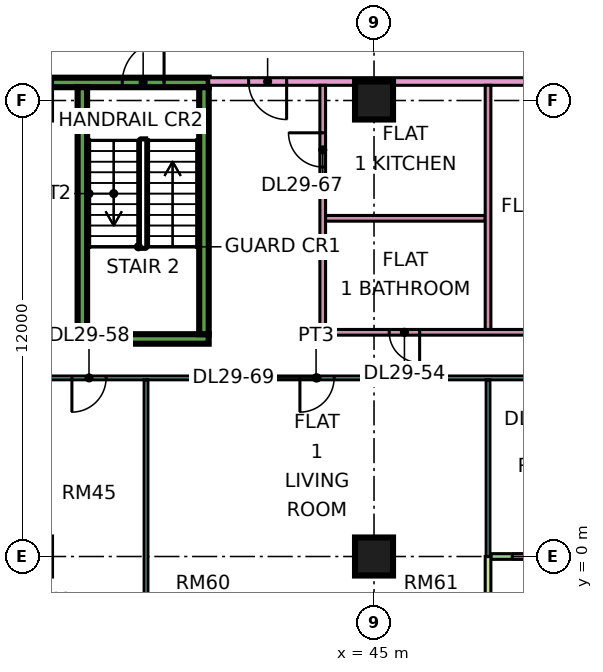
"""IFC4 building model, lengths in metres.
Left out: names, types, materials, properties, quantities, classifications, styles, units other than length and angle.
Written with IfcOpenShell. Run it as: python <this file> out.ifc"""

import sys

from ifc_helpers import new_model, si_unit, direction, frame, frame_2d, origin, origin_2d, place, context, subcontext, project, spatial, rectangle, extrude, element, fill, save


model = new_model("IFC4")
c1 = context("Model", 3, precision=1e-05, world=origin(), true_north=direction((0.0, 1.0)))
c2 = subcontext(c1, "Body", "Model", "MODEL_VIEW")
j1 = project(units=[si_unit("LENGTHUNIT", "METRE"), si_unit("PLANEANGLEUNIT", "RADIAN")], contexts=[c1])
p1 = place(None, origin())
s1 = spatial("IfcSite", under=j1, at=p1, CompositionType="ELEMENT")
p2 = place(p1, origin())
s2 = spatial("IfcBuilding", under=s1, at=p2, CompositionType="ELEMENT")
p3 = place(p2, frame((0.0, 0.0, 125.65)))
s3 = spatial("IfcBuildingStorey", under=s2, at=p3, CompositionType="ELEMENT", Elevation=125.65)
for number, where, z_axis, x_axis in (
    (1, (45.0, 0.0, 0.0), (0.0, 0.0, 1.0), (1.0, 0.0, 0.0)),
    (2, (45.0, 12.0, 0.0), (0.0, 0.0, 1.0), (1.0, 0.0, 0.0)),
):
    element("IfcColumn", number, at=place(p3, frame(where, z_axis=z_axis, x_axis=x_axis)), inside=s3, PredefinedType="COLUMN", context=c2, shape_type="SweptSolid", body=[
        extrude(rectangle(XDim=1.0, YDim=1.0, at=origin_2d()), origin(), (0.0, 0.0, 1.0), 3.75),
    ])
p4 = place(p3, frame((37.2, 5.725, 0.0), z_axis=(0.0, 0.0, 1.0), x_axis=(1.0, 0.0, 0.0)))
e3 = element("IfcWall", 3, at=p4, inside=s3, PredefinedType="SHEAR", context=c2, shape_type="SweptSolid", body=[
    extrude(rectangle(XDim=3.45, YDim=0.25, at=frame_2d((1.725, 0.0))), origin(), (0.0, 0.0, 1.0), 3.75),
])
p5 = place(p3, frame((36.5, 12.475, 0.0), z_axis=(0.0, 0.0, 1.0), x_axis=(1.0, 0.0, 0.0)))
e4 = element("IfcWall", 4, at=p5, inside=s3, PredefinedType="SHEAR", context=c2, shape_type="SweptSolid", body=[
    extrude(rectangle(XDim=4.15, YDim=0.25, at=frame_2d((2.075, 0.0))), origin(), (0.0, 0.0, 1.0), 3.75),
])
p6 = place(p5, frame((1.875, 0.0, 0.0)))
e5 = element("IfcOpeningElement", 5, at=p6, cuts=e4, PredefinedType="OPENING", context=c2, shape_type="SweptSolid", body=[
    extrude(rectangle(XDim=1.1, YDim=2.2, at=frame_2d((0.55, 1.1))), frame((0.0, 0.135, 0.0), z_axis=(0.0, -1.0, 0.0), x_axis=(1.0, 0.0, 0.0)), (0.0, 0.0, 1.0), 0.27),
])
for number, where, z_axis, x_axis in (
    (6, (37.325, 5.85, 0.0), (0.0, 0.0, 1.0), (0.0, 1.0, 0.0)),
    (7, (40.525, 5.85, 0.0), (0.0, 0.0, 1.0), (0.0, 1.0, 0.0)),
):
    element("IfcWall", number, at=place(p3, frame(where, z_axis=z_axis, x_axis=x_axis)), inside=s3, PredefinedType="SHEAR", context=c2, shape_type="SweptSolid", body=[
        extrude(rectangle(XDim=6.5, YDim=0.25, at=frame_2d((3.25, 0.0))), origin(), (0.0, 0.0, 1.0), 3.75),
    ])
p7 = place(p3, frame((48.075, 0.0, 0.0), z_axis=(0.0, 0.0, 1.0), x_axis=(1.0, 0.0, 0.0)))
e8 = element("IfcWall", 8, at=p7, inside=s3, PredefinedType="SOLIDWALL", context=c2, shape_type="SweptSolid", body=[
    extrude(rectangle(XDim=11.85, YDim=0.15, at=frame_2d((5.925, 0.0))), origin(), (0.0, 0.0, 1.0), 3.35),
])
p8 = place(p7, frame((0.562, 0.0, 0.45)))
e9 = element("IfcOpeningElement", 9, at=p8, cuts=e8, PredefinedType="OPENING", context=c2, shape_type="SweptSolid", body=[
    extrude(rectangle(XDim=1.8, YDim=2.4, at=frame_2d((0.9, 1.2))), frame((0.0, 0.085, 0.0), z_axis=(0.0, -1.0, 0.0), x_axis=(1.0, 0.0, 0.0)), (0.0, 0.0, 1.0), 0.17),
])
p9 = place(p7, frame((3.525, 0.0, 0.0)))
e10 = element("IfcOpeningElement", 10, at=p9, cuts=e8, PredefinedType="OPENING", context=c2, shape_type="SweptSolid", body=[
    extrude(rectangle(XDim=1.2, YDim=2.4, at=frame_2d((0.6, 1.2))), frame((0.0, 0.085, 0.0), z_axis=(0.0, -1.0, 0.0), x_axis=(1.0, 0.0, 0.0)), (0.0, 0.0, 1.0), 0.17),
])
p10 = place(p7, frame((7.688, 0.0, 0.45)))
e11 = element("IfcOpeningElement", 11, at=p10, cuts=e8, PredefinedType="OPENING", context=c2, shape_type="SweptSolid", body=[
    extrude(rectangle(XDim=3.0, YDim=2.4, at=frame_2d((1.5, 1.2))), frame((0.0, 0.085, 0.0), z_axis=(0.0, -1.0, 0.0), x_axis=(1.0, 0.0, 0.0)), (0.0, 0.0, 1.0), 0.17),
])
p11 = place(p3, frame((48.0, -1.5, 0.0), z_axis=(0.0, 0.0, 1.0), x_axis=(0.0, 1.0, 0.0)))
e12 = element("IfcWall", 12, at=p11, inside=s3, PredefinedType="SOLIDWALL", context=c2, shape_type="SweptSolid", body=[
    extrude(rectangle(XDim=1.5, YDim=0.15, at=frame_2d((0.75, 0.0))), origin(), (0.0, 0.0, 1.0), 3.35),
])
p12 = place(p3, frame((33.05, 4.7, 0.0), z_axis=(0.0, 0.0, 1.0), x_axis=(1.0, 0.0, 0.0)))
e13 = element("IfcWall", 13, at=p12, inside=s3, PredefinedType="PARTITIONING", context=c2, shape_type="SweptSolid", body=[
    extrude(rectangle(XDim=20.85, YDim=0.1, at=frame_2d((10.425, 0.0))), origin(), (0.0, 0.0, 1.0), 3.35),
])
p13 = place(p12, frame((1.0, 0.0, 0.0)))
e14 = element("IfcOpeningElement", 14, at=p13, cuts=e13, PredefinedType="OPENING", context=c2, shape_type="SweptSolid", body=[
    extrude(rectangle(XDim=0.9, YDim=2.1, at=frame_2d((0.45, 1.05))), frame((0.0, 0.06, 0.0), z_axis=(0.0, -1.0, 0.0), x_axis=(1.0, 0.0, 0.0)), (0.0, 0.0, 1.0), 0.12),
])
p14 = place(p12, frame((4.0, 0.0, 0.0)))
e15 = element("IfcOpeningElement", 15, at=p14, cuts=e13, PredefinedType="OPENING", context=c2, shape_type="SweptSolid", body=[
    extrude(rectangle(XDim=0.9, YDim=2.1, at=frame_2d((0.45, 1.05))), frame((0.0, 0.06, 0.0), z_axis=(0.0, -1.0, 0.0), x_axis=(1.0, 0.0, 0.0)), (0.0, 0.0, 1.0), 0.12),
])
p15 = place(p12, frame((16.0, 0.0, 0.0)))
e16 = element("IfcOpeningElement", 16, at=p15, cuts=e13, PredefinedType="OPENING", context=c2, shape_type="SweptSolid", body=[
    extrude(rectangle(XDim=0.9, YDim=2.1, at=frame_2d((0.45, 1.05))), frame((0.0, 0.06, 0.0), z_axis=(0.0, -1.0, 0.0), x_axis=(1.0, 0.0, 0.0)), (0.0, 0.0, 1.0), 0.12),
])
p16 = place(p12, frame((19.0, 0.0, 0.0)))
e17 = element("IfcOpeningElement", 17, at=p16, cuts=e13, PredefinedType="OPENING", context=c2, shape_type="SweptSolid", body=[
    extrude(rectangle(XDim=0.9, YDim=2.1, at=frame_2d((0.45, 1.05))), frame((0.0, 0.06, 0.0), z_axis=(0.0, -1.0, 0.0), x_axis=(1.0, 0.0, 0.0)), (0.0, 0.0, 1.0), 0.12),
])
p17 = place(p12, frame((10.0, 0.0, 0.0)))
e18 = element("IfcOpeningElement", 18, at=p17, cuts=e13, PredefinedType="OPENING", context=c2, shape_type="SweptSolid", body=[
    extrude(rectangle(XDim=0.9, YDim=2.1, at=frame_2d((0.45, 1.05))), frame((0.0, 0.06, 0.0), z_axis=(0.0, -1.0, 0.0), x_axis=(1.0, 0.0, 0.0)), (0.0, 0.0, 1.0), 0.12),
])
p18 = place(p3, frame((39.0, -1.35, 0.0), z_axis=(0.0, 0.0, 1.0), x_axis=(0.0, 1.0, 0.0)))
e19 = element("IfcWall", 19, at=p18, inside=s3, PredefinedType="PARTITIONING", context=c2, shape_type="SweptSolid", body=[
    extrude(rectangle(XDim=6.0, YDim=0.1, at=frame_2d((3.0, 0.0))), origin(), (0.0, 0.0, 1.0), 3.35),
])
p19 = place(p3, frame((40.65, 12.5, 0.0), z_axis=(0.0, 0.0, 1.0), x_axis=(1.0, 0.0, 0.0)))
e20 = element("IfcWall", 20, at=p19, inside=s3, PredefinedType="PARTITIONING", context=c2, shape_type="SweptSolid", body=[
    extrude(rectangle(XDim=31.35, YDim=0.2, at=frame_2d((15.675, 0.0))), origin(), (0.0, 0.0, 1.0), 3.35),
])
p20 = place(p19, frame((20.1, 0.0, 0.0)))
e21 = element("IfcOpeningElement", 21, at=p20, cuts=e20, PredefinedType="OPENING", context=c2, shape_type="SweptSolid", body=[
    extrude(rectangle(XDim=1.0, YDim=2.1, at=frame_2d((0.5, 1.05))), frame((0.0, 0.11, 0.0), z_axis=(0.0, -1.0, 0.0), x_axis=(1.0, 0.0, 0.0)), (0.0, 0.0, 1.0), 0.22),
])
p21 = place(p19, frame((1.05, 0.0, 0.0)))
e22 = element("IfcOpeningElement", 22, at=p21, cuts=e20, PredefinedType="OPENING", context=c2, shape_type="SweptSolid", body=[
    extrude(rectangle(XDim=1.0, YDim=2.1, at=frame_2d((0.5, 1.05))), frame((0.0, 0.11, 0.0), z_axis=(0.0, -1.0, 0.0), x_axis=(1.0, 0.0, 0.0)), (0.0, 0.0, 1.0), 0.22),
])
p22 = place(p3, frame((43.575, 5.9, 0.0), z_axis=(0.0, 0.0, 1.0), x_axis=(1.0, 0.0, 0.0)))
e23 = element("IfcWall", 23, at=p22, inside=s3, PredefinedType="PARTITIONING", context=c2, shape_type="SweptSolid", body=[
    extrude(rectangle(XDim=10.325, YDim=0.15, at=frame_2d((5.163, 0.0))), origin(), (0.0, 0.0, 1.0), 3.35),
])
p23 = place(p22, frame((1.825, 0.0, 0.0)))
e24 = element("IfcOpeningElement", 24, at=p23, cuts=e23, PredefinedType="OPENING", context=c2, shape_type="SweptSolid", body=[
    extrude(rectangle(XDim=0.8, YDim=2.1, at=frame_2d((0.4, 1.05))), frame((0.0, 0.085, 0.0), z_axis=(0.0, -1.0, 0.0), x_axis=(1.0, 0.0, 0.0)), (0.0, 0.0, 1.0), 0.17),
])
p24 = place(p22, frame((6.975, 0.0, 0.0)))
e25 = element("IfcOpeningElement", 25, at=p24, cuts=e23, PredefinedType="OPENING", context=c2, shape_type="SweptSolid", body=[
    extrude(rectangle(XDim=0.9, YDim=2.1, at=frame_2d((0.45, 1.05))), frame((0.0, 0.085, 0.0), z_axis=(0.0, -1.0, 0.0), x_axis=(1.0, 0.0, 0.0)), (0.0, 0.0, 1.0), 0.17),
])
p25 = place(p3, frame((43.65, 5.975, 0.0), z_axis=(0.0, 0.0, 1.0), x_axis=(0.0, 1.0, 0.0)))
e26 = element("IfcWall", 26, at=p25, inside=s3, PredefinedType="PARTITIONING", context=c2, shape_type="SweptSolid", body=[
    extrude(rectangle(XDim=6.425, YDim=0.15, at=frame_2d((3.212, 0.0))), origin(), (0.0, 0.0, 1.0), 3.35),
])
p26 = place(p25, frame((4.275, 0.0, 0.0)))
e27 = element("IfcOpeningElement", 27, at=p26, cuts=e26, PredefinedType="OPENING", context=c2, shape_type="SweptSolid", body=[
    extrude(rectangle(XDim=0.9, YDim=2.1, at=frame_2d((0.45, 1.05))), frame((0.0, 0.085, 0.0), z_axis=(0.0, -1.0, 0.0), x_axis=(1.0, 0.0, 0.0)), (0.0, 0.0, 1.0), 0.17),
])
p27 = place(p3, frame((43.725, 8.9, 0.0), z_axis=(0.0, 0.0, 1.0), x_axis=(1.0, 0.0, 0.0)))
e28 = element("IfcWall", 28, at=p27, inside=s3, PredefinedType="PARTITIONING", context=c2, shape_type="SweptSolid", body=[
    extrude(rectangle(XDim=4.2, YDim=0.15, at=frame_2d((2.1, 0.0))), origin(), (0.0, 0.0, 1.0), 3.35),
])
p28 = place(p3, frame((48.0, 0.0, 0.0), z_axis=(0.0, 0.0, 1.0), x_axis=(0.0, 1.0, 0.0)))
e29 = element("IfcWall", 29, at=p28, inside=s3, PredefinedType="PARTITIONING", context=c2, shape_type="SweptSolid", body=[
    extrude(rectangle(XDim=4.65, YDim=0.1, at=frame_2d((2.325, 0.0))), origin(), (0.0, 0.0, 1.0), 3.35),
])
p29 = place(p3, frame((48.0, 5.975, 0.0), z_axis=(0.0, 0.0, 1.0), x_axis=(0.0, 1.0, 0.0)))
e30 = element("IfcWall", 30, at=p29, inside=s3, PredefinedType="PARTITIONING", context=c2, shape_type="SweptSolid", body=[
    extrude(rectangle(XDim=6.425, YDim=0.15, at=frame_2d((3.212, 0.0))), origin(), (0.0, 0.0, 1.0), 3.35),
])
p30 = place(p8, origin())
e31 = element("IfcWindow", 31, at=p30, inside=s3, PartitioningType="SINGLE_PANEL", PredefinedType="WINDOW", context=c2, shape_type="SweptSolid", body=[
    extrude(rectangle(XDim=1.8, YDim=2.4, at=frame_2d((0.9, 1.2))), frame((0.0, 0.03, 0.0), z_axis=(0.0, -1.0, 0.0), x_axis=(1.0, 0.0, 0.0)), (0.0, 0.0, 1.0), 0.06),
])
fill(e9, e31)
p31 = place(p6, frame((1.1, 0.0, 0.0), z_axis=(0.0, 0.0, 1.0), x_axis=(-1.0, 0.0, 0.0)))
e32 = element("IfcDoor", 32, at=p31, inside=s3, OperationType="SINGLE_SWING_RIGHT", PredefinedType="DOOR", context=c2, shape_type="SweptSolid", body=[
    extrude(rectangle(XDim=1.1, YDim=2.2, at=frame_2d((0.55, 1.1))), frame((0.0, 0.025, 0.0), z_axis=(0.0, -1.0, 0.0), x_axis=(1.0, 0.0, 0.0)), (0.0, 0.0, 1.0), 0.05),
])
fill(e5, e32)
p32 = place(p23, origin())
e33 = element("IfcDoor", 33, at=p32, inside=s3, OperationType="SINGLE_SWING_RIGHT", PredefinedType="DOOR", context=c2, shape_type="SweptSolid", body=[
    extrude(rectangle(XDim=0.8, YDim=2.1, at=frame_2d((0.4, 1.05))), frame((0.0, 0.025, 0.0), z_axis=(0.0, -1.0, 0.0), x_axis=(1.0, 0.0, 0.0)), (0.0, 0.0, 1.0), 0.05),
])
fill(e24, e33)
p33 = place(p14, frame((0.9, 0.0, 0.0), z_axis=(0.0, 0.0, 1.0), x_axis=(-1.0, 0.0, 0.0)))
e34 = element("IfcDoor", 34, at=p33, inside=s3, OperationType="SINGLE_SWING_LEFT", PredefinedType="DOOR", context=c2, shape_type="SweptSolid", body=[
    extrude(rectangle(XDim=0.9, YDim=2.1, at=frame_2d((0.45, 1.05))), frame((0.0, 0.025, 0.0), z_axis=(0.0, -1.0, 0.0), x_axis=(1.0, 0.0, 0.0)), (0.0, 0.0, 1.0), 0.05),
])
fill(e15, e34)
p34 = place(p21, origin())
e35 = element("IfcDoor", 35, at=p34, inside=s3, OperationType="SINGLE_SWING_RIGHT", PredefinedType="DOOR", context=c2, shape_type="SweptSolid", body=[
    extrude(rectangle(XDim=1.0, YDim=2.1, at=frame_2d((0.5, 1.05))), frame((0.0, 0.025, 0.0), z_axis=(0.0, -1.0, 0.0), x_axis=(1.0, 0.0, 0.0)), (0.0, 0.0, 1.0), 0.05),
])
fill(e22, e35)
p35 = place(p26, frame((0.9, 0.0, 0.0), z_axis=(0.0, 0.0, 1.0), x_axis=(-1.0, 0.0, 0.0)))
e36 = element("IfcDoor", 36, at=p35, inside=s3, OperationType="SINGLE_SWING_RIGHT", PredefinedType="DOOR", context=c2, shape_type="SweptSolid", body=[
    extrude(rectangle(XDim=0.9, YDim=2.1, at=frame_2d((0.45, 1.05))), frame((0.0, 0.025, 0.0), z_axis=(0.0, -1.0, 0.0), x_axis=(1.0, 0.0, 0.0)), (0.0, 0.0, 1.0), 0.05),
])
fill(e27, e36)
p36 = place(p17, frame((0.9, 0.0, 0.0), z_axis=(0.0, 0.0, 1.0), x_axis=(-1.0, 0.0, 0.0)))
e37 = element("IfcDoor", 37, at=p36, inside=s3, OperationType="SINGLE_SWING_LEFT", PredefinedType="DOOR", context=c2, shape_type="SweptSolid", body=[
    extrude(rectangle(XDim=0.9, YDim=2.1, at=frame_2d((0.45, 1.05))), frame((0.0, 0.025, 0.0), z_axis=(0.0, -1.0, 0.0), x_axis=(1.0, 0.0, 0.0)), (0.0, 0.0, 1.0), 0.05),
])
fill(e18, e37)
save(model, sys.argv[1])
